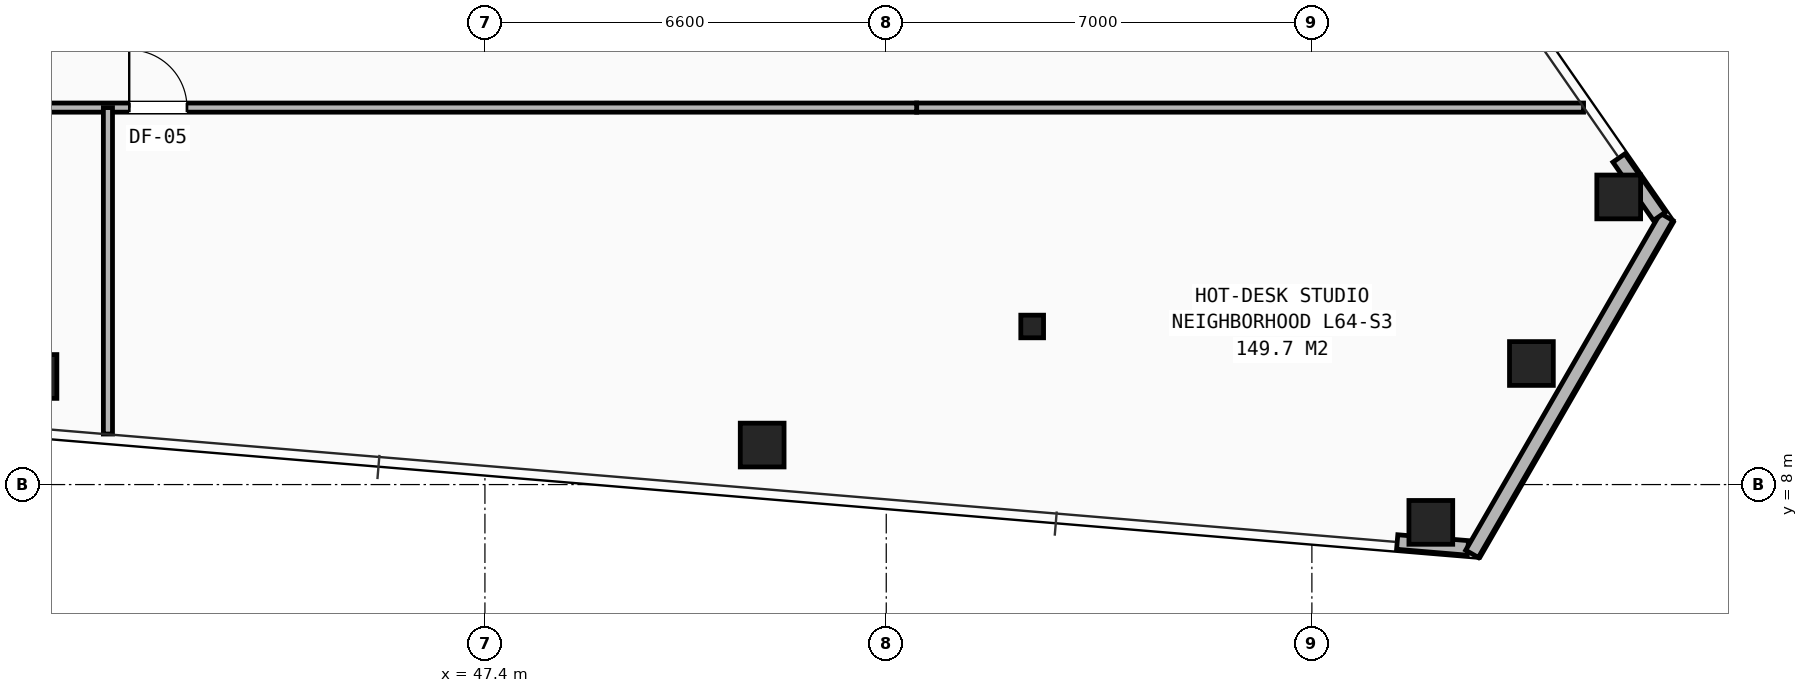
"""IFC4 building model, lengths in metres.
Left out: names, types, materials, properties, quantities, classifications, styles, units other than length and angle.
Written with IfcOpenShell. Run it as: python <this file> out.ifc"""

import sys

from ifc_helpers import new_model, si_unit, direction, frame, frame_2d, origin, origin_2d, place, context, subcontext, project, spatial, rectangle, hollow_rectangle, i_section, extrude, element, fill, save


model = new_model("IFC4")
c1 = context("Model", 3, precision=1e-05, world=origin(), true_north=direction((0.0, 1.0)))
c2 = subcontext(c1, "Body", "Model", "MODEL_VIEW")
j1 = project(units=[si_unit("LENGTHUNIT", "METRE"), si_unit("PLANEANGLEUNIT", "RADIAN")], contexts=[c1])
p1 = place(None, origin())
s1 = spatial("IfcSite", under=j1, at=p1, CompositionType="ELEMENT")
p2 = place(p1, origin())
s2 = spatial("IfcBuilding", under=s1, at=p2, CompositionType="ELEMENT")
p3 = place(p2, frame((0.0, 0.0, 225.9)))
s3 = spatial("IfcBuildingStorey", under=s2, at=p3, CompositionType="ELEMENT", Elevation=225.9)
p4 = place(p3, frame((56.4, 10.6, 0.0), z_axis=(0.0, 0.0, 1.0), x_axis=(1.0, 0.0, 0.0)))
e1 = element("IfcColumn", 1, at=p4, inside=s3, PredefinedType="COLUMN", context=c2, shape_type="SweptSolid", body=[
    extrude(i_section(OverallWidth=0.374, OverallDepth=0.372, WebThickness=0.016, FlangeThickness=0.026, at=origin_2d()), origin(), (0.0, 0.0, 1.0), 3.5),
])
for number, where, z_axis, x_axis in (
    (2, (40.0, 9.778, 0.0), (0.0, 0.0, 1.0), (1.0, 0.0, 0.0)),
    (3, (51.959, 8.65, 0.0), (0.0, 0.0, 1.0), (1.0, 0.0, 0.0)),
    (4, (62.956, 7.378, 0.0), (0.0, 0.0, 1.0), (1.0, 0.0, 0.0)),
    (5, (64.61, 9.991, 0.0), (0.0, 0.0, 1.0), (1.0, 0.0, 0.0)),
    (6, (66.046, 12.73, 0.0), (0.0, 0.0, 1.0), (1.0, 0.0, 0.0)),
):
    element("IfcColumn", number, at=place(p3, frame(where, z_axis=z_axis, x_axis=x_axis)), inside=s3, PredefinedType="COLUMN", context=c2, shape_type="SweptSolid", body=[
        extrude(hollow_rectangle(XDim=0.72, YDim=0.72, WallThickness=0.05, at=origin_2d()), origin(), (0.0, 0.0, 1.0), 3.5),
    ])
p5 = place(p3, frame((62.403, 7.055, 0.0), z_axis=(0.0, 0.0, 1.0), x_axis=(0.99652987462, -0.083235863609, 0.0)))
e7 = element("IfcWall", 7, at=p5, inside=s3, PredefinedType="SHEAR", context=c2, shape_type="SweptSolid", body=[
    extrude(rectangle(XDim=1.167, YDim=0.24, at=frame_2d((0.584, 0.0))), origin(), (0.0, 0.0, 1.0), 2.623),
])
p6 = place(p3, frame((66.834, 12.403, 0.0), z_axis=(0.0, 0.0, 1.0), x_axis=(-0.499999833739, -0.866025499775, 0.0)))
e8 = element("IfcWall", 8, at=p6, inside=s3, PredefinedType="SHEAR", context=c2, shape_type="SweptSolid", body=[
    extrude(rectangle(XDim=6.4, YDim=0.24, at=frame_2d((3.2, 0.0))), origin(), (0.0, 0.0, 1.0), 2.623),
])
p7 = place(p3, frame((66.715, 12.412, 0.0), z_axis=(0.0, 0.0, 1.0), x_axis=(-0.57028607051, 0.821446162437, 0.0)))
e9 = element("IfcWall", 9, at=p7, inside=s3, PredefinedType="SHEAR", context=c2, shape_type="SweptSolid", body=[
    extrude(rectangle(XDim=1.167, YDim=0.24, at=frame_2d((0.584, 0.0))), origin(), (0.0, 0.0, 1.0), 2.623),
])
p8 = place(p3, frame((54.5, 14.2, 0.0), z_axis=(0.0, 0.0, 1.0), x_axis=(1.0, 0.0, 0.0)))
e10 = element("IfcWall", 10, at=p8, inside=s3, PredefinedType="PARTITIONING", context=c2, shape_type="SweptSolid", body=[
    extrude(rectangle(XDim=10.968, YDim=0.15, at=frame_2d((5.484, 0.0))), origin(), (0.0, 0.0, 1.0), 2.292),
])
p9 = place(p3, frame((25.5, 14.2, 0.0), z_axis=(0.0, 0.0, 1.0), x_axis=(1.0, 0.0, 0.0)))
e11 = element("IfcWall", 11, at=p9, inside=s3, PredefinedType="PARTITIONING", context=c2, shape_type="SweptSolid", body=[
    extrude(rectangle(XDim=29.0, YDim=0.15, at=frame_2d((14.5, 0.0))), origin(), (0.0, 0.0, 1.0), 2.292),
])
p10 = place(p9, frame((0.85, 0.0, 0.0)))
e12 = element("IfcOpeningElement", 12, at=p10, cuts=e11, PredefinedType="OPENING", context=c2, shape_type="SweptSolid", body=[
    extrude(rectangle(XDim=0.95, YDim=2.1, at=frame_2d((0.475, 1.05))), frame((0.0, 0.085, 0.0), z_axis=(0.0, -1.0, 0.0), x_axis=(1.0, 0.0, 0.0)), (0.0, 0.0, 1.0), 0.17),
])
p11 = place(p9, frame((9.35, 0.0, 0.0)))
e13 = element("IfcOpeningElement", 13, at=p11, cuts=e11, PredefinedType="OPENING", context=c2, shape_type="SweptSolid", body=[
    extrude(rectangle(XDim=0.95, YDim=2.1, at=frame_2d((0.475, 1.05))), frame((0.0, 0.085, 0.0), z_axis=(0.0, -1.0, 0.0), x_axis=(1.0, 0.0, 0.0)), (0.0, 0.0, 1.0), 0.17),
])
p12 = place(p9, frame((16.05, 0.0, 0.0)))
e14 = element("IfcOpeningElement", 14, at=p12, cuts=e11, PredefinedType="OPENING", context=c2, shape_type="SweptSolid", body=[
    extrude(rectangle(XDim=0.95, YDim=2.1, at=frame_2d((0.475, 1.05))), frame((0.0, 0.085, 0.0), z_axis=(0.0, -1.0, 0.0), x_axis=(1.0, 0.0, 0.0)), (0.0, 0.0, 1.0), 0.17),
])
p13 = place(p3, frame((41.2, 8.831, 0.0), z_axis=(0.0, 0.0, 1.0), x_axis=(0.0, 1.0, 0.0)))
e15 = element("IfcWall", 15, at=p13, inside=s3, PredefinedType="PARTITIONING", context=c2, shape_type="SweptSolid", body=[
    extrude(rectangle(XDim=5.369, YDim=0.15, at=frame_2d((2.684, 0.0))), origin(), (0.0, 0.0, 1.0), 2.628),
])
p14 = place(p12, origin())
e16 = element("IfcDoor", 16, at=p14, inside=s3, OperationType="SINGLE_SWING_LEFT", PredefinedType="DOOR", context=c2, shape_type="SweptSolid", body=[
    extrude(rectangle(XDim=0.95, YDim=2.1, at=frame_2d((0.475, 1.05))), frame((0.0, 0.025, 0.0), z_axis=(0.0, -1.0, 0.0), x_axis=(1.0, 0.0, 0.0)), (0.0, 0.0, 1.0), 0.05),
])
fill(e14, e16)
save(model, sys.argv[1])
